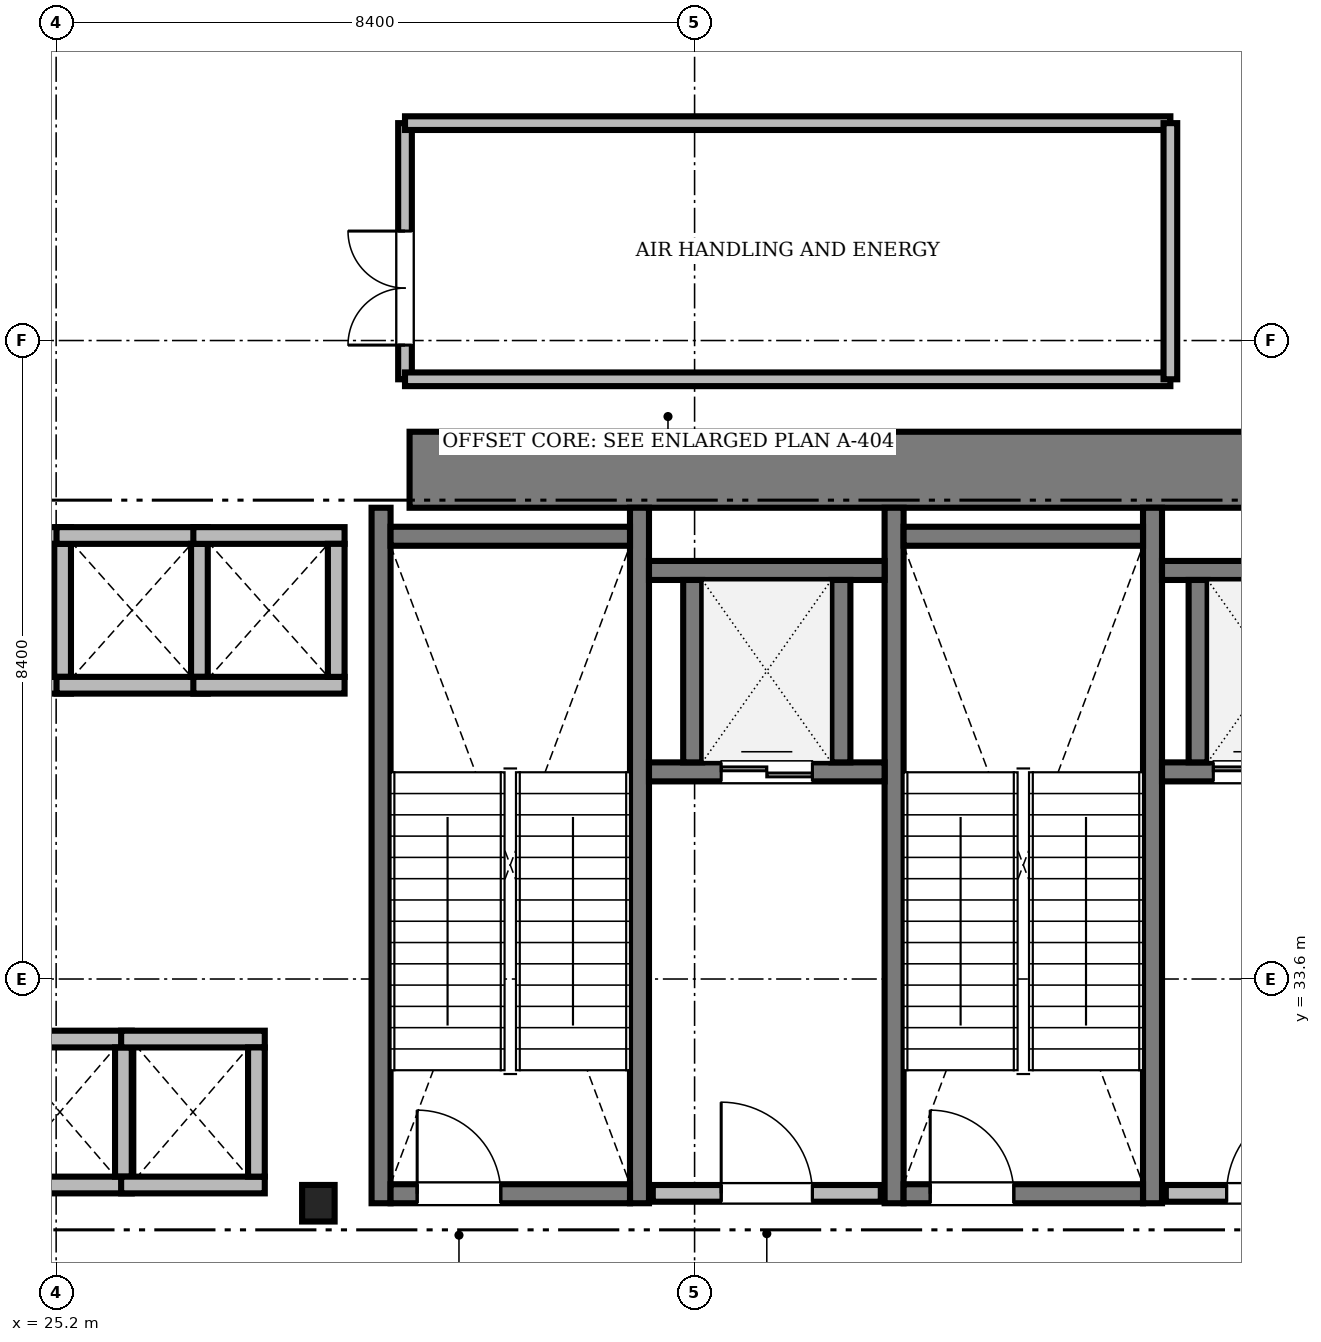
"""IFC4 building model, lengths in metres.
Left out: names, types, materials, properties, quantities, classifications, styles, units other than length and angle.
Written with IfcOpenShell. Run it as: python <this file> out.ifc"""

import sys

from ifc_helpers import new_model, si_unit, direction, frame, frame_2d, origin, origin_2d, place, context, subcontext, project, spatial, rectangle, i_section, extrude, source, transform, mapped, element, fill, save


model = new_model("IFC4")
c1 = context("Model", 3, precision=1e-05, world=origin(), true_north=direction((0.0, 1.0)))
c2 = subcontext(c1, "Body", "Model", "MODEL_VIEW")
j1 = project(units=[si_unit("LENGTHUNIT", "METRE"), si_unit("PLANEANGLEUNIT", "RADIAN")], contexts=[c1])
p1 = place(None, origin())
s1 = spatial("IfcSite", under=j1, at=p1, CompositionType="ELEMENT")
p2 = place(p1, origin())
s2 = spatial("IfcBuilding", under=s1, at=p2, CompositionType="ELEMENT")
p3 = place(p2, frame((0.0, 0.0, 93.3)))
s3 = spatial("IfcBuildingStorey", under=s2, at=p3, CompositionType="ELEMENT", Elevation=93.3)
m1 = source(origin(), c2, "Body", "SweptSolid", [
    extrude(rectangle(XDim=17.52, YDim=1.0, at=frame_2d((8.76, 0.0))), origin(), (0.0, 0.0, 1.0), 4.75),
])
p4 = place(p3, frame((29.85, 40.3, 0.0), z_axis=(0.0, 0.0, 1.0), x_axis=(1.0, 0.0, 0.0)))
e1 = element("IfcWall", 1, at=p4, inside=s3, PredefinedType="SHEAR", context=c2, shape_type="MappedRepresentation", body=[
    mapped(m1, transform((0.0, 0.0, 0.0), scale=1.0)),
])
m2 = source(origin(), c2, "Body", "SweptSolid", [
    extrude(i_section(OverallWidth=0.428, OverallDepth=0.481, WebThickness=0.04, FlangeThickness=0.063, FilletRadius=0.015, at=origin_2d()), origin(), (0.0, 0.0, 1.0), 4.75),
])
p5 = place(p3, frame((28.65, 30.65, 0.0), z_axis=(0.0, 0.0, 1.0), x_axis=(1.0, 0.0, 0.0)))
e2 = element("IfcColumn", 2, at=p5, inside=s3, PredefinedType="COLUMN", context=c2, shape_type="MappedRepresentation", body=[
    mapped(m2, transform((0.0, 0.0, 0.0), scale=1.0)),
])
m3 = source(origin(), c2, "Body", "SweptSolid", [
    extrude(rectangle(XDim=9.15, YDim=0.25, at=frame_2d((4.575, 0.0))), origin(), (0.0, 0.0, 1.0), 5.2),
])
for number, where, z_axis, x_axis in (
    (3, (29.475, 30.65, 0.0), (0.0, 0.0, 1.0), (0.0, 1.0, 0.0)),
    (4, (32.875, 30.65, 0.0), (0.0, 0.0, 1.0), (0.0, 1.0, 0.0)),
):
    element("IfcWall", number, at=place(p3, frame(where, z_axis=z_axis, x_axis=x_axis)), inside=s3, PredefinedType="SOLIDWALL", context=c2, shape_type="MappedRepresentation", body=[
        mapped(m3, transform((0.0, 0.0, 0.0), scale=1.0)),
    ])
m4 = source(origin(), c2, "Body", "SweptSolid", [
    extrude(rectangle(XDim=3.15, YDim=0.25, at=frame_2d((1.575, 0.0))), origin(), (0.0, 0.0, 1.0), 5.2),
])
p6 = place(p3, frame((29.6, 39.425, 0.0), z_axis=(0.0, 0.0, 1.0), x_axis=(1.0, 0.0, 0.0)))
e5 = element("IfcWall", 5, at=p6, inside=s3, PredefinedType="SOLIDWALL", context=c2, shape_type="MappedRepresentation", body=[
    mapped(m4, transform((0.0, 0.0, 0.0), scale=1.0)),
])
p7 = place(p3, frame((29.6, 30.775, 0.0), z_axis=(0.0, 0.0, 1.0), x_axis=(1.0, 0.0, 0.0)))
e6 = element("IfcWall", 6, at=p7, inside=s3, PredefinedType="SOLIDWALL", context=c2, shape_type="MappedRepresentation", body=[
    mapped(m4, transform((0.0, 0.0, 0.0), scale=1.0)),
])
m5 = source(origin(), c2, "Body", "SweptSolid", [
    extrude(rectangle(XDim=1.1, YDim=2.2, at=frame_2d((0.55, 1.1))), frame((0.0, 0.135, 0.0), z_axis=(0.0, -1.0, 0.0), x_axis=(1.0, 0.0, 0.0)), (0.0, 0.0, 1.0), 0.27),
])
p8 = place(p7, frame((0.35, 0.0, 0.0)))
e7 = element("IfcOpeningElement", 7, at=p8, cuts=e6, PredefinedType="OPENING", context=c2, shape_type="MappedRepresentation", body=[
    mapped(m5, transform((0.0, 0.0, 0.0), scale=1.0)),
])
for number, where, z_axis, x_axis in (
    (8, (36.225, 30.65, 0.0), (0.0, 0.0, 1.0), (0.0, 1.0, 0.0)),
    (9, (39.625, 30.65, 0.0), (0.0, 0.0, 1.0), (0.0, 1.0, 0.0)),
):
    element("IfcWall", number, at=place(p3, frame(where, z_axis=z_axis, x_axis=x_axis)), inside=s3, PredefinedType="SOLIDWALL", context=c2, shape_type="MappedRepresentation", body=[
        mapped(m3, transform((0.0, 0.0, 0.0), scale=1.0)),
    ])
p9 = place(p3, frame((36.35, 39.425, 0.0), z_axis=(0.0, 0.0, 1.0), x_axis=(1.0, 0.0, 0.0)))
e10 = element("IfcWall", 10, at=p9, inside=s3, PredefinedType="SOLIDWALL", context=c2, shape_type="MappedRepresentation", body=[
    mapped(m4, transform((0.0, 0.0, 0.0), scale=1.0)),
])
p10 = place(p3, frame((36.35, 30.775, 0.0), z_axis=(0.0, 0.0, 1.0), x_axis=(1.0, 0.0, 0.0)))
e11 = element("IfcWall", 11, at=p10, inside=s3, PredefinedType="SOLIDWALL", context=c2, shape_type="MappedRepresentation", body=[
    mapped(m4, transform((0.0, 0.0, 0.0), scale=1.0)),
])
p11 = place(p10, frame((0.35, 0.0, 0.0)))
e12 = element("IfcOpeningElement", 12, at=p11, cuts=e11, PredefinedType="OPENING", context=c2, shape_type="MappedRepresentation", body=[
    mapped(m5, transform((0.0, 0.0, 0.0), scale=1.0)),
])
m6 = source(origin(), c2, "Body", "SweptSolid", [
    extrude(rectangle(XDim=3.0, YDim=0.22, at=frame_2d((1.5, 0.0))), origin(), (0.0, 0.0, 1.0), 4.75),
])
p12 = place(p3, frame((33.05, 30.78, 0.0), z_axis=(0.0, 0.0, 1.0), x_axis=(1.0, 0.0, 0.0)))
e13 = element("IfcWall", 13, at=p12, inside=s3, PredefinedType="SOLIDWALL", context=c2, shape_type="MappedRepresentation", body=[
    mapped(m6, transform((0.0, 0.0, 0.0), scale=1.0)),
])
m7 = source(origin(), c2, "Body", "SweptSolid", [
    extrude(rectangle(XDim=1.2, YDim=2.2, at=frame_2d((0.6, 1.1))), frame((0.0, 0.12, 0.0), z_axis=(0.0, -1.0, 0.0), x_axis=(1.0, 0.0, 0.0)), (0.0, 0.0, 1.0), 0.24),
])
p13 = place(p12, frame((0.9, 0.0, 0.0)))
e14 = element("IfcOpeningElement", 14, at=p13, cuts=e13, PredefinedType="OPENING", context=c2, shape_type="MappedRepresentation", body=[
    mapped(m7, transform((0.0, 0.0, 0.0), scale=1.0)),
])
m8 = source(origin(), c2, "Body", "SweptSolid", [
    extrude(rectangle(XDim=2.8, YDim=0.22, at=frame_2d((1.4, 0.0))), origin(), (0.0, 0.0, 1.0), 4.75),
])
p14 = place(p3, frame((39.8, 30.78, 0.0), z_axis=(0.0, 0.0, 1.0), x_axis=(1.0, 0.0, 0.0)))
e15 = element("IfcWall", 15, at=p14, inside=s3, PredefinedType="SOLIDWALL", context=c2, shape_type="MappedRepresentation", body=[
    mapped(m8, transform((0.0, 0.0, 0.0), scale=1.0)),
])
p15 = place(p14, frame((0.8, 0.0, 0.0)))
e16 = element("IfcOpeningElement", 16, at=p15, cuts=e15, PredefinedType="OPENING", context=c2, shape_type="MappedRepresentation", body=[
    mapped(m7, transform((0.0, 0.0, 0.0), scale=1.0)),
])
m9 = source(origin(), c2, "Body", "SweptSolid", [
    extrude(rectangle(XDim=1.99, YDim=0.22, at=frame_2d((0.995, 0.0))), origin(), (0.0, 0.0, 1.0), 4.75),
])
for number, where, z_axis, x_axis in (
    (17, (23.405, 37.465, 0.0), (0.0, 0.0, 1.0), (1.0, 0.0, 0.0)),
    (18, (23.405, 39.435, 0.0), (0.0, 0.0, 1.0), (1.0, 0.0, 0.0)),
):
    element("IfcWall", number, at=place(p3, frame(where, z_axis=z_axis, x_axis=x_axis)), inside=s3, PredefinedType="SOLIDWALL", context=c2, shape_type="MappedRepresentation", body=[
        mapped(m9, transform((0.0, 0.0, 0.0), scale=1.0)),
    ])
m10 = source(origin(), c2, "Body", "SweptSolid", [
    extrude(rectangle(XDim=1.75, YDim=0.22, at=frame_2d((0.875, 0.0))), origin(), (0.0, 0.0, 1.0), 4.75),
])
p16 = place(p3, frame((25.285, 37.575, 0.0), z_axis=(0.0, 0.0, 1.0), x_axis=(0.0, 1.0, 0.0)))
e19 = element("IfcWall", 19, at=p16, inside=s3, PredefinedType="SOLIDWALL", context=c2, shape_type="MappedRepresentation", body=[
    mapped(m10, transform((0.0, 0.0, 0.0), scale=1.0)),
])
for number, where, z_axis, x_axis in (
    (20, (25.205, 37.465, 0.0), (0.0, 0.0, 1.0), (1.0, 0.0, 0.0)),
    (21, (25.205, 39.435, 0.0), (0.0, 0.0, 1.0), (1.0, 0.0, 0.0)),
):
    element("IfcWall", number, at=place(p3, frame(where, z_axis=z_axis, x_axis=x_axis)), inside=s3, PredefinedType="SOLIDWALL", context=c2, shape_type="MappedRepresentation", body=[
        mapped(m9, transform((0.0, 0.0, 0.0), scale=1.0)),
    ])
p17 = place(p3, frame((27.085, 37.575, 0.0), z_axis=(0.0, 0.0, 1.0), x_axis=(0.0, 1.0, 0.0)))
e22 = element("IfcWall", 22, at=p17, inside=s3, PredefinedType="SOLIDWALL", context=c2, shape_type="MappedRepresentation", body=[
    mapped(m10, transform((0.0, 0.0, 0.0), scale=1.0)),
])
m11 = source(origin(), c2, "Body", "SweptSolid", [
    extrude(rectangle(XDim=1.99, YDim=0.22, at=frame_2d((0.995, 0.0))), origin(), (0.0, 0.0, 1.0), 4.75),
])
for number, where, z_axis, x_axis in (
    (23, (27.005, 37.465, 0.0), (0.0, 0.0, 1.0), (1.0, 0.0, 0.0)),
    (24, (27.005, 39.435, 0.0), (0.0, 0.0, 1.0), (1.0, 0.0, 0.0)),
):
    element("IfcWall", number, at=place(p3, frame(where, z_axis=z_axis, x_axis=x_axis)), inside=s3, PredefinedType="SOLIDWALL", context=c2, shape_type="MappedRepresentation", body=[
        mapped(m11, transform((0.0, 0.0, 0.0), scale=1.0)),
    ])
p18 = place(p3, frame((28.885, 37.575, 0.0), z_axis=(0.0, 0.0, 1.0), x_axis=(0.0, 1.0, 0.0)))
e25 = element("IfcWall", 25, at=p18, inside=s3, PredefinedType="SOLIDWALL", context=c2, shape_type="MappedRepresentation", body=[
    mapped(m10, transform((0.0, 0.0, 0.0), scale=1.0)),
])
m12 = source(origin(), c2, "Body", "SweptSolid", [
    extrude(rectangle(XDim=3.1, YDim=0.25, at=frame_2d((1.55, 0.0))), origin(), (0.0, 0.0, 1.0), 4.75),
])
p19 = place(p3, frame((33.0, 36.325, 0.0), z_axis=(0.0, 0.0, 1.0), x_axis=(1.0, 0.0, 0.0)))
e26 = element("IfcWall", 26, at=p19, inside=s3, PredefinedType="SOLIDWALL", context=c2, shape_type="MappedRepresentation", body=[
    mapped(m12, transform((0.0, 0.0, 0.0), scale=1.0)),
])
m13 = source(origin(), c2, "Body", "SweptSolid", [
    extrude(rectangle(XDim=1.2, YDim=2.25, at=frame_2d((0.6, 1.125))), frame((0.0, 0.135, 0.0), z_axis=(0.0, -1.0, 0.0), x_axis=(1.0, 0.0, 0.0)), (0.0, 0.0, 1.0), 0.27),
])
p20 = place(p19, frame((0.95, 0.0, 0.0)))
e27 = element("IfcOpeningElement", 27, at=p20, cuts=e26, PredefinedType="OPENING", context=c2, shape_type="MappedRepresentation", body=[
    mapped(m13, transform((0.0, 0.0, 0.0), scale=1.0)),
])
p21 = place(p3, frame((33.0, 38.975, 0.0), z_axis=(0.0, 0.0, 1.0), x_axis=(1.0, 0.0, 0.0)))
e28 = element("IfcWall", 28, at=p21, inside=s3, PredefinedType="SOLIDWALL", context=c2, shape_type="MappedRepresentation", body=[
    mapped(m12, transform((0.0, 0.0, 0.0), scale=1.0)),
])
m14 = source(origin(), c2, "Body", "SweptSolid", [
    extrude(rectangle(XDim=2.4, YDim=0.25, at=frame_2d((1.2, 0.0))), origin(), (0.0, 0.0, 1.0), 4.75),
])
for number, where, z_axis, x_axis in (
    (29, (33.575, 36.45, 0.0), (0.0, 0.0, 1.0), (0.0, 1.0, 0.0)),
    (30, (35.525, 36.45, 0.0), (0.0, 0.0, 1.0), (0.0, 1.0, 0.0)),
):
    element("IfcWall", number, at=place(p3, frame(where, z_axis=z_axis, x_axis=x_axis)), inside=s3, PredefinedType="SOLIDWALL", context=c2, shape_type="MappedRepresentation", body=[
        mapped(m14, transform((0.0, 0.0, 0.0), scale=1.0)),
    ])
m15 = source(origin(), c2, "Body", "SweptSolid", [
    extrude(rectangle(XDim=2.55, YDim=0.25, at=frame_2d((1.275, 0.0))), origin(), (0.0, 0.0, 1.0), 4.75),
])
p22 = place(p3, frame((39.75, 36.325, 0.0), z_axis=(0.0, 0.0, 1.0), x_axis=(1.0, 0.0, 0.0)))
e31 = element("IfcWall", 31, at=p22, inside=s3, PredefinedType="SOLIDWALL", context=c2, shape_type="MappedRepresentation", body=[
    mapped(m15, transform((0.0, 0.0, 0.0), scale=1.0)),
])
p23 = place(p22, frame((0.675, 0.0, 0.0)))
e32 = element("IfcOpeningElement", 32, at=p23, cuts=e31, PredefinedType="OPENING", context=c2, shape_type="MappedRepresentation", body=[
    mapped(m13, transform((0.0, 0.0, 0.0), scale=1.0)),
])
p24 = place(p3, frame((39.75, 38.975, 0.0), z_axis=(0.0, 0.0, 1.0), x_axis=(1.0, 0.0, 0.0)))
e33 = element("IfcWall", 33, at=p24, inside=s3, PredefinedType="SOLIDWALL", context=c2, shape_type="MappedRepresentation", body=[
    mapped(m15, transform((0.0, 0.0, 0.0), scale=1.0)),
])
p25 = place(p3, frame((40.225, 36.45, 0.0), z_axis=(0.0, 0.0, 1.0), x_axis=(0.0, 1.0, 0.0)))
e34 = element("IfcWall", 34, at=p25, inside=s3, PredefinedType="SOLIDWALL", context=c2, shape_type="MappedRepresentation", body=[
    mapped(m14, transform((0.0, 0.0, 0.0), scale=1.0)),
])
m16 = source(origin(), c2, "Body", "SweptSolid", [
    extrude(rectangle(XDim=1.89, YDim=0.22, at=frame_2d((0.945, 0.0))), origin(), (0.0, 0.0, 1.0), 4.75),
])
for number, where, z_axis, x_axis in (
    (35, (24.305, 30.89, 0.0), (0.0, 0.0, 1.0), (1.0, 0.0, 0.0)),
    (36, (24.305, 32.81, 0.0), (0.0, 0.0, 1.0), (1.0, 0.0, 0.0)),
):
    element("IfcWall", number, at=place(p3, frame(where, z_axis=z_axis, x_axis=x_axis)), inside=s3, PredefinedType="SOLIDWALL", context=c2, shape_type="MappedRepresentation", body=[
        mapped(m16, transform((0.0, 0.0, 0.0), scale=1.0)),
    ])
m17 = source(origin(), c2, "Body", "SweptSolid", [
    extrude(rectangle(XDim=1.7, YDim=0.22, at=frame_2d((0.85, 0.0))), origin(), (0.0, 0.0, 1.0), 4.75),
])
p26 = place(p3, frame((26.085, 31.0, 0.0), z_axis=(0.0, 0.0, 1.0), x_axis=(0.0, 1.0, 0.0)))
e37 = element("IfcWall", 37, at=p26, inside=s3, PredefinedType="SOLIDWALL", context=c2, shape_type="MappedRepresentation", body=[
    mapped(m17, transform((0.0, 0.0, 0.0), scale=1.0)),
])
for number, where, z_axis, x_axis in (
    (38, (26.055, 30.89, 0.0), (0.0, 0.0, 1.0), (1.0, 0.0, 0.0)),
    (39, (26.055, 32.81, 0.0), (0.0, 0.0, 1.0), (1.0, 0.0, 0.0)),
):
    element("IfcWall", number, at=place(p3, frame(where, z_axis=z_axis, x_axis=x_axis)), inside=s3, PredefinedType="SOLIDWALL", context=c2, shape_type="MappedRepresentation", body=[
        mapped(m16, transform((0.0, 0.0, 0.0), scale=1.0)),
    ])
p27 = place(p3, frame((27.835, 31.0, 0.0), z_axis=(0.0, 0.0, 1.0), x_axis=(0.0, 1.0, 0.0)))
e40 = element("IfcWall", 40, at=p27, inside=s3, PredefinedType="SOLIDWALL", context=c2, shape_type="MappedRepresentation", body=[
    mapped(m17, transform((0.0, 0.0, 0.0), scale=1.0)),
])
m18 = source(origin(), c2, "Body", "SweptSolid", [
    extrude(rectangle(XDim=3.37, YDim=0.18, at=frame_2d((1.685, 0.0))), origin(), (0.0, 0.0, 1.0), 4.75),
])
p28 = place(p3, frame((29.79, 41.49, 0.0), z_axis=(0.0, 0.0, 1.0), x_axis=(0.0, 1.0, 0.0)))
e41 = element("IfcWall", 41, at=p28, inside=s3, PredefinedType="PARTITIONING", context=c2, shape_type="MappedRepresentation", body=[
    mapped(m18, transform((0.0, 0.0, 0.0), scale=1.0)),
])
m19 = source(origin(), c2, "Body", "SweptSolid", [
    extrude(rectangle(XDim=1.5, YDim=2.3, at=frame_2d((0.75, 1.15))), frame((0.0, 0.1, 0.0), z_axis=(0.0, -1.0, 0.0), x_axis=(1.0, 0.0, 0.0)), (0.0, 0.0, 1.0), 0.2),
])
p29 = place(p28, frame((0.45, 0.0, 0.0)))
e42 = element("IfcOpeningElement", 42, at=p29, cuts=e41, PredefinedType="OPENING", context=c2, shape_type="MappedRepresentation", body=[
    mapped(m19, transform((0.0, 0.0, 0.0), scale=1.0)),
])
m20 = source(origin(), c2, "Body", "SweptSolid", [
    extrude(rectangle(XDim=10.07, YDim=0.18, at=frame_2d((5.035, 0.0))), origin(), (0.0, 0.0, 1.0), 4.75),
])
for number, where, z_axis, x_axis in (
    (43, (29.79, 41.49, 0.0), (0.0, 0.0, 1.0), (1.0, 0.0, 0.0)),
    (44, (29.79, 44.86, 0.0), (0.0, 0.0, 1.0), (1.0, 0.0, 0.0)),
):
    element("IfcWall", number, at=place(p3, frame(where, z_axis=z_axis, x_axis=x_axis)), inside=s3, PredefinedType="PARTITIONING", context=c2, shape_type="MappedRepresentation", body=[
        mapped(m20, transform((0.0, 0.0, 0.0), scale=1.0)),
    ])
p30 = place(p3, frame((39.86, 41.49, 0.0), z_axis=(0.0, 0.0, 1.0), x_axis=(0.0, 1.0, 0.0)))
e45 = element("IfcWall", 45, at=p30, inside=s3, PredefinedType="PARTITIONING", context=c2, shape_type="MappedRepresentation", body=[
    mapped(m18, transform((0.0, 0.0, 0.0), scale=1.0)),
])
m21 = source(origin(), c2, "Body", "SweptSolid", [
    extrude(rectangle(XDim=1.1, YDim=2.2, at=frame_2d((0.55, 1.1))), frame((0.0, 0.025, 0.0), z_axis=(0.0, -1.0, 0.0), x_axis=(1.0, 0.0, 0.0)), (0.0, 0.0, 1.0), 0.05),
])
p31 = place(p8, origin())
e46 = element("IfcDoor", 46, at=p31, inside=s3, OperationType="SINGLE_SWING_LEFT", PredefinedType="DOOR", context=c2, shape_type="MappedRepresentation", body=[
    mapped(m21, transform((0.0, 0.0, 0.0), scale=1.0)),
])
fill(e7, e46)
p32 = place(p11, origin())
e47 = element("IfcDoor", 47, at=p32, inside=s3, OperationType="SINGLE_SWING_LEFT", PredefinedType="DOOR", context=c2, shape_type="MappedRepresentation", body=[
    mapped(m21, transform((0.0, 0.0, 0.0), scale=1.0)),
])
fill(e12, e47)
m22 = source(origin(), c2, "Body", "SweptSolid", [
    extrude(rectangle(XDim=1.2, YDim=2.2, at=frame_2d((0.6, 1.1))), frame((0.0, 0.025, 0.0), z_axis=(0.0, -1.0, 0.0), x_axis=(1.0, 0.0, 0.0)), (0.0, 0.0, 1.0), 0.05),
])
p33 = place(p13, origin())
e48 = element("IfcDoor", 48, at=p33, inside=s3, OperationType="SINGLE_SWING_LEFT", PredefinedType="DOOR", context=c2, shape_type="MappedRepresentation", body=[
    mapped(m22, transform((0.0, 0.0, 0.0), scale=1.0)),
])
fill(e14, e48)
p34 = place(p15, origin())
e49 = element("IfcDoor", 49, at=p34, inside=s3, OperationType="SINGLE_SWING_RIGHT", PredefinedType="DOOR", context=c2, shape_type="MappedRepresentation", body=[
    mapped(m22, transform((0.0, 0.0, 0.0), scale=1.0)),
])
fill(e16, e49)
m23 = source(origin(), c2, "Body", "SweptSolid", [
    extrude(rectangle(XDim=1.2, YDim=2.25, at=frame_2d((0.6, 1.125))), frame((0.0, 0.025, 0.0), z_axis=(0.0, -1.0, 0.0), x_axis=(1.0, 0.0, 0.0)), (0.0, 0.0, 1.0), 0.05),
])
p35 = place(p20, origin())
e50 = element("IfcDoor", 50, at=p35, inside=s3, OperationType="DOUBLE_DOOR_SLIDING", PredefinedType="DOOR", context=c2, shape_type="MappedRepresentation", body=[
    mapped(m23, transform((0.0, 0.0, 0.0), scale=1.0)),
])
fill(e27, e50)
p36 = place(p23, origin())
e51 = element("IfcDoor", 51, at=p36, inside=s3, OperationType="DOUBLE_DOOR_SLIDING", PredefinedType="DOOR", context=c2, shape_type="MappedRepresentation", body=[
    mapped(m23, transform((0.0, 0.0, 0.0), scale=1.0)),
])
fill(e32, e51)
m24 = source(origin(), c2, "Body", "SweptSolid", [
    extrude(rectangle(XDim=1.5, YDim=2.3, at=frame_2d((0.75, 1.15))), frame((0.0, 0.025, 0.0), z_axis=(0.0, -1.0, 0.0), x_axis=(1.0, 0.0, 0.0)), (0.0, 0.0, 1.0), 0.05),
])
p37 = place(p29, origin())
e52 = element("IfcDoor", 52, at=p37, inside=s3, OperationType="DOUBLE_DOOR_SINGLE_SWING", PredefinedType="DOOR", context=c2, shape_type="MappedRepresentation", body=[
    mapped(m24, transform((0.0, 0.0, 0.0), scale=1.0)),
])
fill(e42, e52)
save(model, sys.argv[1])
